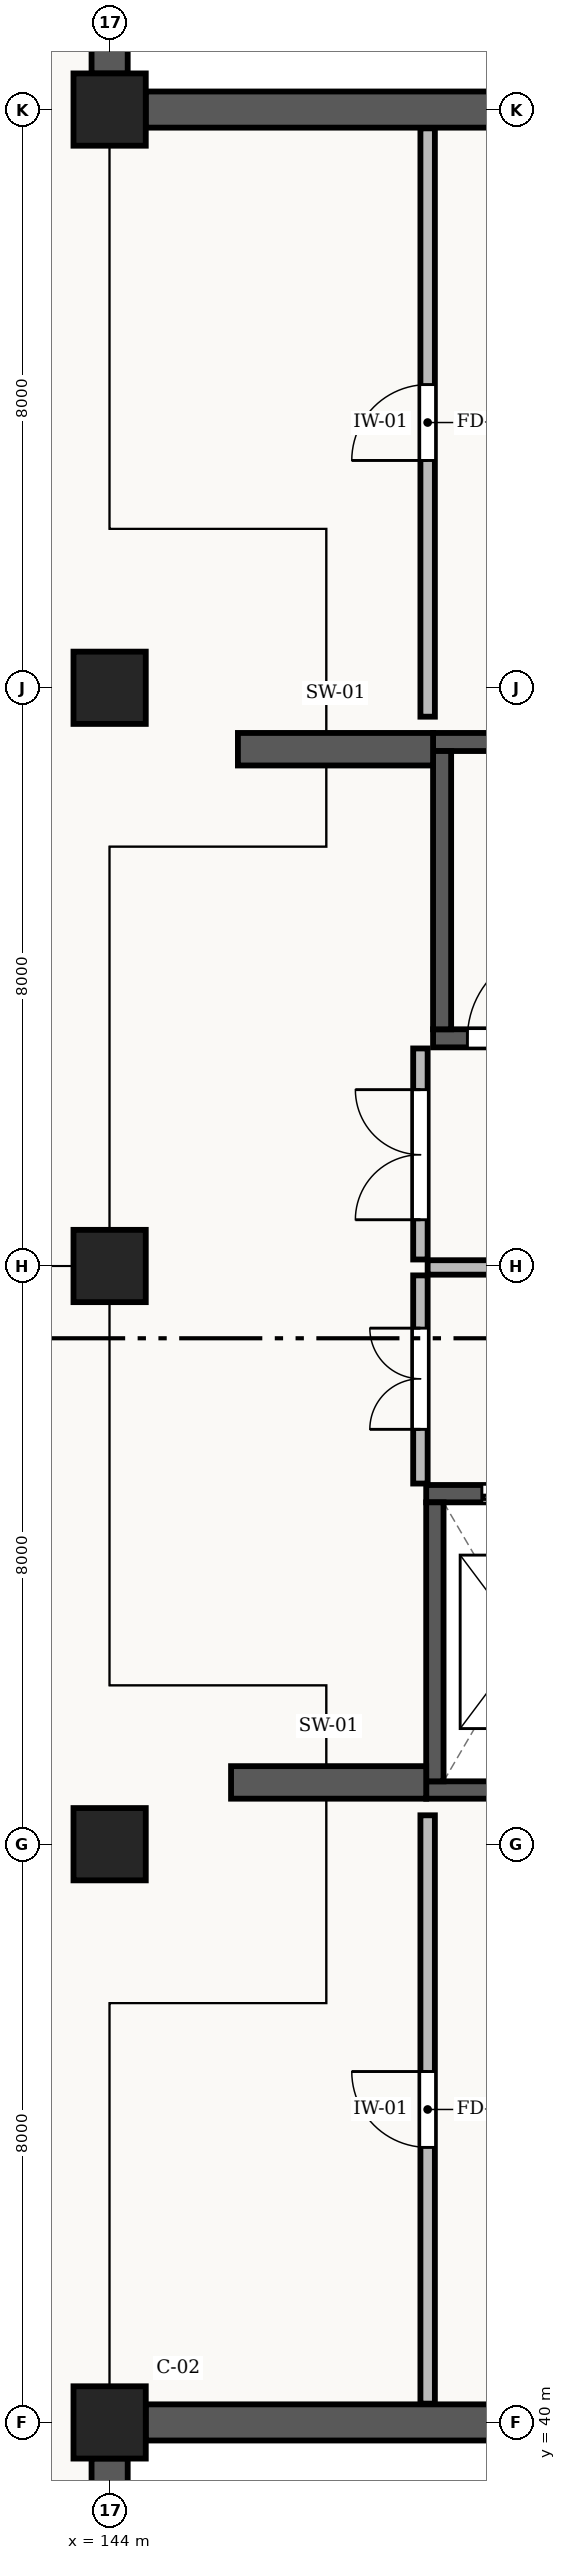
"""IFC4 building model, lengths in metres.
Left out: names, types, materials, properties, quantities, classifications, styles, units other than length and angle.
Written with IfcOpenShell. Run it as: python <this file> out.ifc"""

import sys

from ifc_helpers import new_model, si_unit, direction, frame, frame_2d, origin, origin_2d, place, context, subcontext, project, spatial, rectangle, extrude, element, fill, save


model = new_model("IFC4")
c1 = context("Model", 3, precision=1e-05, world=origin(), true_north=direction((0.0, 1.0)))
c2 = subcontext(c1, "Body", "Model", "MODEL_VIEW")
j1 = project(units=[si_unit("LENGTHUNIT", "METRE"), si_unit("PLANEANGLEUNIT", "RADIAN")], contexts=[c1])
p1 = place(None, origin())
s1 = spatial("IfcSite", under=j1, at=p1, CompositionType="ELEMENT")
p2 = place(p1, origin())
s2 = spatial("IfcBuilding", under=s1, at=p2, CompositionType="ELEMENT")
p3 = place(p2, frame((0.0, 0.0, -6.0)))
s3 = spatial("IfcBuildingStorey", under=s2, at=p3, CompositionType="ELEMENT", Elevation=-6.0)
for number, where, z_axis, x_axis in (
    (1, (144.0, 40.0, 0.0), (0.0, 0.0, 1.0), (1.0, 0.0, 0.0)),
    (2, (144.0, 48.0, 0.0), (0.0, 0.0, 1.0), (1.0, 0.0, 0.0)),
    (3, (144.0, 56.0, 0.0), (0.0, 0.0, 1.0), (1.0, 0.0, 0.0)),
    (4, (144.0, 64.0, 0.0), (0.0, 0.0, 1.0), (1.0, 0.0, 0.0)),
    (5, (144.0, 72.0, 0.0), (0.0, 0.0, 1.0), (1.0, 0.0, 0.0)),
):
    element("IfcColumn", number, at=place(p3, frame(where, z_axis=z_axis, x_axis=x_axis)), inside=s3, PredefinedType="COLUMN", context=c2, shape_type="SweptSolid", body=[
        extrude(rectangle(XDim=1.0, YDim=1.0, at=origin_2d()), origin(), (0.0, 0.0, 1.0), 6.0),
    ])
p4 = place(p3, frame((144.0, 79.502, 0.0), z_axis=(0.0, 0.0, 1.0), x_axis=(0.0, -1.0, 0.0)))
e6 = element("IfcWall", 6, at=p4, inside=s3, PredefinedType="STANDARD", context=c2, shape_type="SweptSolid", body=[
    extrude(rectangle(XDim=7.004, YDim=0.5, at=frame_2d((3.502, 0.0))), origin(), (0.0, 0.0, 1.0), 5.56),
])
for number, where, z_axis, x_axis in (
    (7, (144.498, 72.0, 0.0), (0.0, 0.0, 1.0), (1.0, 0.0, 0.0)),
    (8, (152.477, 40.0, 0.0), (0.0, 0.0, 1.0), (-1.0, 0.0, 0.0)),
):
    element("IfcWall", number, at=place(p3, frame(where, z_axis=z_axis, x_axis=x_axis)), inside=s3, PredefinedType="STANDARD", context=c2, shape_type="SweptSolid", body=[
        extrude(rectangle(XDim=7.979, YDim=0.5, at=frame_2d((3.99, 0.0))), origin(), (0.0, 0.0, 1.0), 5.56),
    ])
p5 = place(p3, frame((144.0, 39.502, 0.0), z_axis=(0.0, 0.0, 1.0), x_axis=(0.0, -1.0, 0.0)))
e9 = element("IfcWall", 9, at=p5, inside=s3, PredefinedType="STANDARD", context=c2, shape_type="SweptSolid", body=[
    extrude(rectangle(XDim=7.004, YDim=0.5, at=frame_2d((3.502, 0.0))), origin(), (0.0, 0.0, 1.0), 5.56),
])
p6 = place(p3, frame((148.475, 59.15, 0.0), z_axis=(0.0, 0.0, 1.0), x_axis=(1.0, 0.0, 0.0)))
e10 = element("IfcWall", 10, at=p6, inside=s3, PredefinedType="SHEAR", context=c2, shape_type="SweptSolid", body=[
    extrude(rectangle(XDim=9.65, YDim=0.25, at=frame_2d((4.825, 0.0))), origin(), (0.0, 0.0, 1.0), 5.55),
])
p7 = place(p6, frame((0.475, 0.0, 0.0)))
e11 = element("IfcOpeningElement", 11, at=p7, cuts=e10, PredefinedType="OPENING", context=c2, shape_type="SweptSolid", body=[
    extrude(rectangle(XDim=1.25, YDim=2.15, at=frame_2d((0.625, 1.075))), frame((0.0, 0.137, 0.0), z_axis=(0.0, -1.0, 0.0), x_axis=(1.0, 0.0, 0.0)), (0.0, 0.0, 1.0), 0.274),
])
p8 = place(p3, frame((158.125, 63.25, 0.0), z_axis=(0.0, 0.0, 1.0), x_axis=(-1.0, 0.0, 0.0)))
e12 = element("IfcWall", 12, at=p8, inside=s3, PredefinedType="SHEAR", context=c2, shape_type="SweptSolid", body=[
    extrude(rectangle(XDim=9.65, YDim=0.25, at=frame_2d((4.825, 0.0))), origin(), (0.0, 0.0, 1.0), 5.55),
])
p9 = place(p3, frame((148.6, 63.125, 0.0), z_axis=(0.0, 0.0, 1.0), x_axis=(0.0, -1.0, 0.0)))
e13 = element("IfcWall", 13, at=p9, inside=s3, PredefinedType="SHEAR", context=c2, shape_type="SweptSolid", body=[
    extrude(rectangle(XDim=3.85, YDim=0.25, at=frame_2d((1.925, 0.0))), origin(), (0.0, 0.0, 1.0), 5.55),
])
p10 = place(p3, frame((148.38, 48.75, 0.0), z_axis=(0.0, 0.0, 1.0), x_axis=(1.0, 0.0, 0.0)))
e14 = element("IfcWall", 14, at=p10, inside=s3, PredefinedType="SHEAR", context=c2, shape_type="SweptSolid", body=[
    extrude(rectangle(XDim=2.74, YDim=0.24, at=frame_2d((1.37, 0.0))), origin(), (0.0, 0.0, 1.0), 5.55),
])
p11 = place(p3, frame((151.12, 52.85, 0.0), z_axis=(0.0, 0.0, 1.0), x_axis=(-1.0, 0.0, 0.0)))
e15 = element("IfcWall", 15, at=p11, inside=s3, PredefinedType="SHEAR", context=c2, shape_type="SweptSolid", body=[
    extrude(rectangle(XDim=2.74, YDim=0.24, at=frame_2d((1.37, 0.0))), origin(), (0.0, 0.0, 1.0), 5.55),
])
p12 = place(p11, frame((0.77, 0.0, 0.0)))
e16 = element("IfcOpeningElement", 16, at=p12, cuts=e15, PredefinedType="OPENING", context=c2, shape_type="SweptSolid", body=[
    extrude(rectangle(XDim=1.2, YDim=2.2, at=frame_2d((0.6, 1.1))), frame((0.0, 0.132, 0.0), z_axis=(0.0, -1.0, 0.0), x_axis=(1.0, 0.0, 0.0)), (0.0, 0.0, 1.0), 0.264),
])
p13 = place(p3, frame((148.5, 52.73, 0.0), z_axis=(0.0, 0.0, 1.0), x_axis=(0.0, -1.0, 0.0)))
e17 = element("IfcWall", 17, at=p13, inside=s3, PredefinedType="SHEAR", context=c2, shape_type="SweptSolid", body=[
    extrude(rectangle(XDim=3.86, YDim=0.24, at=frame_2d((1.93, 0.0))), origin(), (0.0, 0.0, 1.0), 5.55),
])
p14 = place(p3, frame((145.68, 48.855, 0.0), z_axis=(0.0, 0.0, 1.0), x_axis=(1.0, 0.0, 0.0)))
e18 = element("IfcWall", 18, at=p14, inside=s3, PredefinedType="SHEAR", context=c2, shape_type="SweptSolid", body=[
    extrude(rectangle(XDim=2.7, YDim=0.45, at=frame_2d((1.35, 0.0))), origin(), (0.0, 0.0, 1.0), 4.6),
])
p15 = place(p3, frame((145.775, 63.15, 0.0), z_axis=(0.0, 0.0, 1.0), x_axis=(1.0, 0.0, 0.0)))
e19 = element("IfcWall", 19, at=p15, inside=s3, PredefinedType="SHEAR", context=c2, shape_type="SweptSolid", body=[
    extrude(rectangle(XDim=2.7, YDim=0.45, at=frame_2d((1.35, 0.0))), origin(), (0.0, 0.0, 1.0), 4.6),
])
p16 = place(p3, frame((148.4, 55.98, 0.0), z_axis=(0.0, 0.0, 1.0), x_axis=(1.0, 0.0, 0.0)))
e20 = element("IfcWall", 20, at=p16, inside=s3, PredefinedType="STANDARD", context=c2, shape_type="SweptSolid", body=[
    extrude(rectangle(XDim=9.5, YDim=0.2, at=frame_2d((4.75, 0.0))), origin(), (0.0, 0.0, 1.0), 4.48),
])
p17 = place(p16, frame((5.2, 0.0, 0.0)))
e21 = element("IfcOpeningElement", 21, at=p17, cuts=e20, PredefinedType="OPENING", context=c2, shape_type="SweptSolid", body=[
    extrude(rectangle(XDim=1.4, YDim=2.2, at=frame_2d((0.7, 1.1))), frame((0.0, 0.112, 0.0), z_axis=(0.0, -1.0, 0.0), x_axis=(1.0, 0.0, 0.0)), (0.0, 0.0, 1.0), 0.224),
])
p18 = place(p3, frame((148.3, 52.99, 0.0), z_axis=(0.0, 0.0, 1.0), x_axis=(0.0, 1.0, 0.0)))
e22 = element("IfcWall", 22, at=p18, inside=s3, PredefinedType="STANDARD", context=c2, shape_type="SweptSolid", body=[
    extrude(rectangle(XDim=2.88, YDim=0.2, at=frame_2d((1.44, 0.0))), origin(), (0.0, 0.0, 1.0), 5.55),
])
p19 = place(p18, frame((0.75, 0.0, 0.0)))
e23 = element("IfcOpeningElement", 23, at=p19, cuts=e22, PredefinedType="OPENING", context=c2, shape_type="SweptSolid", body=[
    extrude(rectangle(XDim=1.4, YDim=2.2, at=frame_2d((0.7, 1.1))), frame((0.0, 0.112, 0.0), z_axis=(0.0, -1.0, 0.0), x_axis=(1.0, 0.0, 0.0)), (0.0, 0.0, 1.0), 0.224),
])
p20 = place(p3, frame((148.3, 56.09, 0.0), z_axis=(0.0, 0.0, 1.0), x_axis=(0.0, 1.0, 0.0)))
e24 = element("IfcWall", 24, at=p20, inside=s3, PredefinedType="STANDARD", context=c2, shape_type="SweptSolid", body=[
    extrude(rectangle(XDim=2.92, YDim=0.2, at=frame_2d((1.46, 0.0))), origin(), (0.0, 0.0, 1.0), 5.55),
])
p21 = place(p20, frame((0.55, 0.0, 0.0)))
e25 = element("IfcOpeningElement", 25, at=p21, cuts=e24, PredefinedType="OPENING", context=c2, shape_type="SweptSolid", body=[
    extrude(rectangle(XDim=1.8, YDim=2.2, at=frame_2d((0.9, 1.1))), frame((0.0, 0.112, 0.0), z_axis=(0.0, -1.0, 0.0), x_axis=(1.0, 0.0, 0.0)), (0.0, 0.0, 1.0), 0.224),
])
p22 = place(p3, frame((148.4, 40.26, 0.0), z_axis=(0.0, 0.0, 1.0), x_axis=(0.0, 1.0, 0.0)))
e26 = element("IfcWall", 26, at=p22, inside=s3, PredefinedType="STANDARD", context=c2, shape_type="SweptSolid", body=[
    extrude(rectangle(XDim=8.14, YDim=0.2, at=frame_2d((4.07, 0.0))), origin(), (0.0, 0.0, 1.0), 5.55),
])
p23 = place(p22, frame((3.545, 0.0, 0.0)))
e27 = element("IfcOpeningElement", 27, at=p23, cuts=e26, PredefinedType="OPENING", context=c2, shape_type="SweptSolid", body=[
    extrude(rectangle(XDim=1.05, YDim=2.15, at=frame_2d((0.525, 1.075))), frame((0.0, 0.112, 0.0), z_axis=(0.0, -1.0, 0.0), x_axis=(1.0, 0.0, 0.0)), (0.0, 0.0, 1.0), 0.224),
])
p24 = place(p3, frame((148.4, 63.6, 0.0), z_axis=(0.0, 0.0, 1.0), x_axis=(0.0, 1.0, 0.0)))
e28 = element("IfcWall", 28, at=p24, inside=s3, PredefinedType="STANDARD", context=c2, shape_type="SweptSolid", body=[
    extrude(rectangle(XDim=8.14, YDim=0.2, at=frame_2d((4.07, 0.0))), origin(), (0.0, 0.0, 1.0), 5.55),
])
p25 = place(p24, frame((3.545, 0.0, 0.0)))
e29 = element("IfcOpeningElement", 29, at=p25, cuts=e28, PredefinedType="OPENING", context=c2, shape_type="SweptSolid", body=[
    extrude(rectangle(XDim=1.05, YDim=2.15, at=frame_2d((0.525, 1.075))), frame((0.0, 0.112, 0.0), z_axis=(0.0, -1.0, 0.0), x_axis=(1.0, 0.0, 0.0)), (0.0, 0.0, 1.0), 0.224),
])
p26 = place(p7, origin())
e30 = element("IfcDoor", 30, at=p26, inside=s3, OperationType="SINGLE_SWING_RIGHT", PredefinedType="DOOR", context=c2, shape_type="SweptSolid", body=[
    extrude(rectangle(XDim=1.25, YDim=2.15, at=frame_2d((0.625, 1.075))), frame((0.0, 0.025, 0.0), z_axis=(0.0, -1.0, 0.0), x_axis=(1.0, 0.0, 0.0)), (0.0, 0.0, 1.0), 0.05),
])
fill(e11, e30)
p27 = place(p12, origin())
e31 = element("IfcDoor", 31, at=p27, inside=s3, OperationType="DOUBLE_DOOR_SLIDING", PredefinedType="DOOR", context=c2, shape_type="SweptSolid", body=[
    extrude(rectangle(XDim=1.2, YDim=2.2, at=frame_2d((0.6, 1.1))), frame((0.0, 0.025, 0.0), z_axis=(0.0, -1.0, 0.0), x_axis=(1.0, 0.0, 0.0)), (0.0, 0.0, 1.0), 0.05),
])
fill(e16, e31)
p28 = place(p19, origin())
e32 = element("IfcDoor", 32, at=p28, inside=s3, OperationType="DOUBLE_DOOR_SINGLE_SWING", PredefinedType="DOOR", context=c2, shape_type="SweptSolid", body=[
    extrude(rectangle(XDim=1.4, YDim=2.2, at=frame_2d((0.7, 1.1))), frame((0.0, 0.025, 0.0), z_axis=(0.0, -1.0, 0.0), x_axis=(1.0, 0.0, 0.0)), (0.0, 0.0, 1.0), 0.05),
])
fill(e23, e32)
p29 = place(p21, origin())
e33 = element("IfcDoor", 33, at=p29, inside=s3, OperationType="DOUBLE_DOOR_SINGLE_SWING", PredefinedType="DOOR", context=c2, shape_type="SweptSolid", body=[
    extrude(rectangle(XDim=1.8, YDim=2.2, at=frame_2d((0.9, 1.1))), frame((0.0, 0.025, 0.0), z_axis=(0.0, -1.0, 0.0), x_axis=(1.0, 0.0, 0.0)), (0.0, 0.0, 1.0), 0.05),
])
fill(e25, e33)
p30 = place(p23, origin())
e34 = element("IfcDoor", 34, at=p30, inside=s3, OperationType="SINGLE_SWING_RIGHT", PredefinedType="DOOR", context=c2, shape_type="SweptSolid", body=[
    extrude(rectangle(XDim=1.05, YDim=2.15, at=frame_2d((0.525, 1.075))), frame((0.0, 0.025, 0.0), z_axis=(0.0, -1.0, 0.0), x_axis=(1.0, 0.0, 0.0)), (0.0, 0.0, 1.0), 0.05),
])
fill(e27, e34)
p31 = place(p25, origin())
e35 = element("IfcDoor", 35, at=p31, inside=s3, OperationType="SINGLE_SWING_LEFT", PredefinedType="DOOR", context=c2, shape_type="SweptSolid", body=[
    extrude(rectangle(XDim=1.05, YDim=2.15, at=frame_2d((0.525, 1.075))), frame((0.0, 0.025, 0.0), z_axis=(0.0, -1.0, 0.0), x_axis=(1.0, 0.0, 0.0)), (0.0, 0.0, 1.0), 0.05),
])
fill(e29, e35)
save(model, sys.argv[1])
